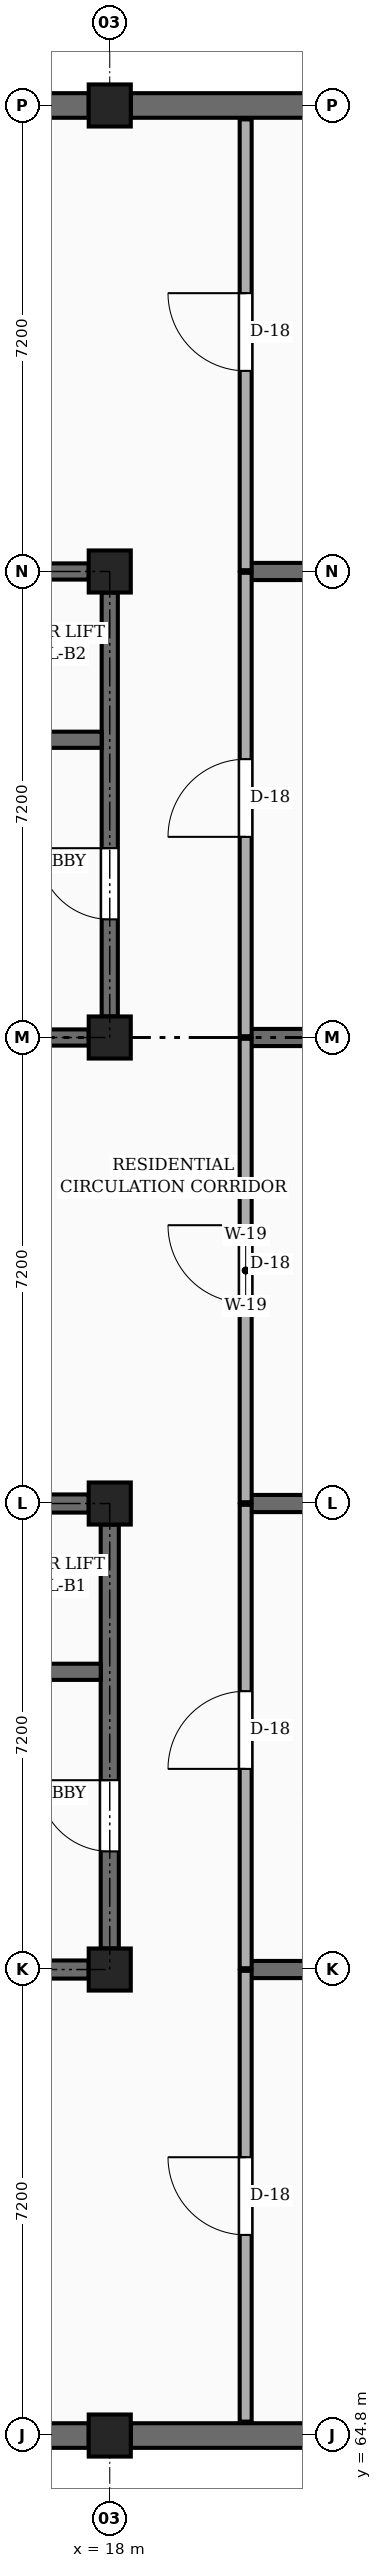
"""IFC4 building model, lengths in metres.
Left out: names, types, materials, properties, quantities, classifications, styles, units other than length and angle.
Written with IfcOpenShell. Run it as: python <this file> out.ifc"""

import sys

from ifc_helpers import new_model, si_unit, direction, frame, frame_2d, origin, origin_2d, place, context, subcontext, project, spatial, rectangle, extrude, element, fill, save


model = new_model("IFC4")
c1 = context("Model", 3, precision=1e-05, world=origin(), true_north=direction((0.0, 1.0)))
c2 = subcontext(c1, "Body", "Model", "MODEL_VIEW")
j1 = project(units=[si_unit("LENGTHUNIT", "METRE"), si_unit("PLANEANGLEUNIT", "RADIAN")], contexts=[c1])
p1 = place(None, origin())
s1 = spatial("IfcSite", under=j1, at=p1, CompositionType="ELEMENT")
p2 = place(p1, origin())
s2 = spatial("IfcBuilding", under=s1, at=p2, CompositionType="ELEMENT")
p3 = place(p2, frame((0.0, 0.0, -4.2)))
s3 = spatial("IfcBuildingStorey", under=s2, at=p3, CompositionType="ELEMENT", Elevation=-4.2)
for number, where, z_axis, x_axis in (
    (1, (18.0, 64.8, 0.0), (0.0, 0.0, 1.0), (1.0, 0.0, 0.0)),
    (2, (18.0, 72.0, 0.0), (0.0, 0.0, 1.0), (1.0, 0.0, 0.0)),
    (3, (18.0, 79.2, 0.0), (0.0, 0.0, 1.0), (1.0, 0.0, 0.0)),
    (4, (18.0, 86.4, 0.0), (0.0, 0.0, 1.0), (1.0, 0.0, 0.0)),
    (5, (18.0, 93.6, 0.0), (0.0, 0.0, 1.0), (1.0, 0.0, 0.0)),
    (6, (18.0, 100.8, 0.0), (0.0, 0.0, 1.0), (1.0, 0.0, 0.0)),
):
    element("IfcColumn", number, at=place(p3, frame(where, z_axis=z_axis, x_axis=x_axis)), inside=s3, PredefinedType="COLUMN", context=c2, shape_type="SweptSolid", body=[
        extrude(rectangle(XDim=0.65, YDim=0.65, at=origin_2d()), origin(), (0.0, 0.0, 1.0), 4.2),
    ])
for number, where, z_axis, x_axis in (
    (7, (11.125, 64.8, 0.0), (0.0, 0.0, 1.0), (1.0, 0.0, 0.0)),
    (8, (17.675, 100.8, 0.0), (0.0, 0.0, 1.0), (-1.0, 0.0, 0.0)),
    (9, (18.325, 64.8, 0.0), (0.0, 0.0, 1.0), (1.0, 0.0, 0.0)),
    (10, (24.875, 100.8, 0.0), (0.0, 0.0, 1.0), (-1.0, 0.0, 0.0)),
):
    element("IfcWall", number, at=place(p3, frame(where, z_axis=z_axis, x_axis=x_axis)), inside=s3, PredefinedType="USERDEFINED", context=c2, shape_type="SweptSolid", body=[
        extrude(rectangle(XDim=6.55, YDim=0.38, at=frame_2d((3.275, 0.0))), origin(), (0.0, 0.0, 1.0), 3.03),
    ])
for number, where, z_axis, x_axis in (
    (11, (20.1, 72.0, 0.0), (0.0, 0.0, 1.0), (1.0, 0.0, 0.0)),
    (12, (20.1, 79.2, 0.0), (0.0, 0.0, 1.0), (1.0, 0.0, 0.0)),
    (13, (20.1, 86.4, 0.0), (0.0, 0.0, 1.0), (1.0, 0.0, 0.0)),
    (14, (20.1, 93.6, 0.0), (0.0, 0.0, 1.0), (1.0, 0.0, 0.0)),
):
    element("IfcWall", number, at=place(p3, frame(where, z_axis=z_axis, x_axis=x_axis)), inside=s3, PredefinedType="SOLIDWALL", context=c2, shape_type="SweptSolid", body=[
        extrude(rectangle(XDim=4.775, YDim=0.265, at=frame_2d((2.387, 0.0))), origin(), (0.0, 0.0, 1.0), 3.18),
    ])
p4 = place(p3, frame((11.125, 79.2, 0.0), z_axis=(0.0, 0.0, 1.0), x_axis=(1.0, 0.0, 0.0)))
e15 = element("IfcWall", 15, at=p4, inside=s3, PredefinedType="SHEAR", context=c2, shape_type="SweptSolid", body=[
    extrude(rectangle(XDim=6.55, YDim=0.28, at=frame_2d((3.275, 0.0))), origin(), (0.0, 0.0, 1.0), 3.88),
])
p5 = place(p3, frame((18.0, 72.325, 0.0), z_axis=(0.0, 0.0, 1.0), x_axis=(0.0, 1.0, 0.0)))
e16 = element("IfcWall", 16, at=p5, inside=s3, PredefinedType="SHEAR", context=c2, shape_type="SweptSolid", body=[
    extrude(rectangle(XDim=6.55, YDim=0.28, at=frame_2d((3.275, 0.0))), origin(), (0.0, 0.0, 1.0), 3.88),
])
p6 = place(p5, frame((1.5, 0.0, 0.0)))
e17 = element("IfcOpeningElement", 17, at=p6, cuts=e16, PredefinedType="OPENING", context=c2, shape_type="SweptSolid", body=[
    extrude(rectangle(XDim=1.1, YDim=2.15, at=frame_2d((0.55, 1.075))), frame((0.0, 0.15, 0.0), z_axis=(0.0, -1.0, 0.0), x_axis=(1.0, 0.0, 0.0)), (0.0, 0.0, 1.0), 0.3),
])
p7 = place(p3, frame((11.125, 72.0, 0.0), z_axis=(0.0, 0.0, 1.0), x_axis=(1.0, 0.0, 0.0)))
e18 = element("IfcWall", 18, at=p7, inside=s3, PredefinedType="SHEAR", context=c2, shape_type="SweptSolid", body=[
    extrude(rectangle(XDim=6.55, YDim=0.28, at=frame_2d((3.275, 0.0))), origin(), (0.0, 0.0, 1.0), 3.88),
])
p8 = place(p7, frame((4.425, 0.0, 0.0)))
e19 = element("IfcOpeningElement", 19, at=p8, cuts=e18, PredefinedType="OPENING", context=c2, shape_type="SweptSolid", body=[
    extrude(rectangle(XDim=1.1, YDim=2.15, at=frame_2d((0.55, 1.075))), frame((0.0, 0.15, 0.0), z_axis=(0.0, -1.0, 0.0), x_axis=(1.0, 0.0, 0.0)), (0.0, 0.0, 1.0), 0.3),
])
p9 = place(p3, frame((14.525, 76.6, 0.0), z_axis=(0.0, 0.0, 1.0), x_axis=(1.0, 0.0, 0.0)))
e20 = element("IfcWall", 20, at=p9, inside=s3, PredefinedType="SHEAR", context=c2, shape_type="SweptSolid", body=[
    extrude(rectangle(XDim=3.335, YDim=0.25, at=frame_2d((1.667, 0.0))), origin(), (0.0, 0.0, 1.0), 3.88),
])
p10 = place(p9, frame((1.1, 0.0, 0.0)))
e21 = element("IfcOpeningElement", 21, at=p10, cuts=e20, PredefinedType="OPENING", context=c2, shape_type="SweptSolid", body=[
    extrude(rectangle(XDim=1.0, YDim=2.2, at=frame_2d((0.5, 1.1))), frame((0.0, 0.135, 0.0), z_axis=(0.0, -1.0, 0.0), x_axis=(1.0, 0.0, 0.0)), (0.0, 0.0, 1.0), 0.27),
])
p11 = place(p3, frame((11.125, 93.6, 0.0), z_axis=(0.0, 0.0, 1.0), x_axis=(1.0, 0.0, 0.0)))
e22 = element("IfcWall", 22, at=p11, inside=s3, PredefinedType="SHEAR", context=c2, shape_type="SweptSolid", body=[
    extrude(rectangle(XDim=6.55, YDim=0.25, at=frame_2d((3.275, 0.0))), origin(), (0.0, 0.0, 1.0), 3.88),
])
p12 = place(p3, frame((18.0, 86.725, 0.0), z_axis=(0.0, 0.0, 1.0), x_axis=(0.0, 1.0, 0.0)))
e23 = element("IfcWall", 23, at=p12, inside=s3, PredefinedType="SHEAR", context=c2, shape_type="SweptSolid", body=[
    extrude(rectangle(XDim=6.55, YDim=0.25, at=frame_2d((3.275, 0.0))), origin(), (0.0, 0.0, 1.0), 3.88),
])
p13 = place(p12, frame((1.5, 0.0, 0.0)))
e24 = element("IfcOpeningElement", 24, at=p13, cuts=e23, PredefinedType="OPENING", context=c2, shape_type="SweptSolid", body=[
    extrude(rectangle(XDim=1.1, YDim=2.15, at=frame_2d((0.55, 1.075))), frame((0.0, 0.135, 0.0), z_axis=(0.0, -1.0, 0.0), x_axis=(1.0, 0.0, 0.0)), (0.0, 0.0, 1.0), 0.27),
])
p14 = place(p3, frame((11.125, 86.4, 0.0), z_axis=(0.0, 0.0, 1.0), x_axis=(1.0, 0.0, 0.0)))
e25 = element("IfcWall", 25, at=p14, inside=s3, PredefinedType="SHEAR", context=c2, shape_type="SweptSolid", body=[
    extrude(rectangle(XDim=6.55, YDim=0.25, at=frame_2d((3.275, 0.0))), origin(), (0.0, 0.0, 1.0), 3.88),
])
p15 = place(p14, frame((4.425, 0.0, 0.0)))
e26 = element("IfcOpeningElement", 26, at=p15, cuts=e25, PredefinedType="OPENING", context=c2, shape_type="SweptSolid", body=[
    extrude(rectangle(XDim=1.1, YDim=2.15, at=frame_2d((0.55, 1.075))), frame((0.0, 0.135, 0.0), z_axis=(0.0, -1.0, 0.0), x_axis=(1.0, 0.0, 0.0)), (0.0, 0.0, 1.0), 0.27),
])
p16 = place(p3, frame((14.525, 91.0, 0.0), z_axis=(0.0, 0.0, 1.0), x_axis=(1.0, 0.0, 0.0)))
e27 = element("IfcWall", 27, at=p16, inside=s3, PredefinedType="SHEAR", context=c2, shape_type="SweptSolid", body=[
    extrude(rectangle(XDim=3.35, YDim=0.25, at=frame_2d((1.675, 0.0))), origin(), (0.0, 0.0, 1.0), 3.88),
])
p17 = place(p16, frame((1.1, 0.0, 0.0)))
e28 = element("IfcOpeningElement", 28, at=p17, cuts=e27, PredefinedType="OPENING", context=c2, shape_type="SweptSolid", body=[
    extrude(rectangle(XDim=1.0, YDim=2.2, at=frame_2d((0.5, 1.1))), frame((0.0, 0.135, 0.0), z_axis=(0.0, -1.0, 0.0), x_axis=(1.0, 0.0, 0.0)), (0.0, 0.0, 1.0), 0.27),
])
p18 = place(p3, frame((20.1, 65.015, 0.0), z_axis=(0.0, 0.0, 1.0), x_axis=(0.0, 1.0, 0.0)))
e29 = element("IfcWall", 29, at=p18, inside=s3, PredefinedType="PARTITIONING", context=c2, shape_type="SweptSolid", body=[
    extrude(rectangle(XDim=6.965, YDim=0.185, at=frame_2d((3.482, 0.0))), origin(), (0.0, 0.0, 1.0), 3.315),
])
p19 = place(p18, frame((2.885, 0.0, 0.0)))
e30 = element("IfcOpeningElement", 30, at=p19, cuts=e29, PredefinedType="OPENING", context=c2, shape_type="SweptSolid", body=[
    extrude(rectangle(XDim=1.2, YDim=2.2, at=frame_2d((0.6, 1.1))), frame((0.0, 0.103, 0.0), z_axis=(0.0, -1.0, 0.0), x_axis=(1.0, 0.0, 0.0)), (0.0, 0.0, 1.0), 0.205),
])
p20 = place(p3, frame((20.1, 72.02, 0.0), z_axis=(0.0, 0.0, 1.0), x_axis=(0.0, 1.0, 0.0)))
e31 = element("IfcWall", 31, at=p20, inside=s3, PredefinedType="PARTITIONING", context=c2, shape_type="SweptSolid", body=[
    extrude(rectangle(XDim=7.16, YDim=0.185, at=frame_2d((3.58, 0.0))), origin(), (0.0, 0.0, 1.0), 3.315),
])
p21 = place(p20, frame((3.08, 0.0, 0.0)))
e32 = element("IfcOpeningElement", 32, at=p21, cuts=e31, PredefinedType="OPENING", context=c2, shape_type="SweptSolid", body=[
    extrude(rectangle(XDim=1.2, YDim=2.2, at=frame_2d((0.6, 1.1))), frame((0.0, 0.103, 0.0), z_axis=(0.0, -1.0, 0.0), x_axis=(1.0, 0.0, 0.0)), (0.0, 0.0, 1.0), 0.205),
])
p22 = place(p3, frame((20.1, 79.22, 0.0), z_axis=(0.0, 0.0, 1.0), x_axis=(0.0, 1.0, 0.0)))
e33 = element("IfcWall", 33, at=p22, inside=s3, PredefinedType="PARTITIONING", context=c2, shape_type="SweptSolid", body=[
    extrude(rectangle(XDim=7.16, YDim=0.185, at=frame_2d((3.58, 0.0))), origin(), (0.0, 0.0, 1.0), 3.315),
])
p23 = place(p22, frame((3.08, 0.0, 0.0)))
e34 = element("IfcOpeningElement", 34, at=p23, cuts=e33, PredefinedType="OPENING", context=c2, shape_type="SweptSolid", body=[
    extrude(rectangle(XDim=1.2, YDim=2.2, at=frame_2d((0.6, 1.1))), frame((0.0, 0.103, 0.0), z_axis=(0.0, -1.0, 0.0), x_axis=(1.0, 0.0, 0.0)), (0.0, 0.0, 1.0), 0.205),
])
p24 = place(p3, frame((20.1, 86.42, 0.0), z_axis=(0.0, 0.0, 1.0), x_axis=(0.0, 1.0, 0.0)))
e35 = element("IfcWall", 35, at=p24, inside=s3, PredefinedType="PARTITIONING", context=c2, shape_type="SweptSolid", body=[
    extrude(rectangle(XDim=7.16, YDim=0.185, at=frame_2d((3.58, 0.0))), origin(), (0.0, 0.0, 1.0), 3.315),
])
p25 = place(p24, frame((3.08, 0.0, 0.0)))
e36 = element("IfcOpeningElement", 36, at=p25, cuts=e35, PredefinedType="OPENING", context=c2, shape_type="SweptSolid", body=[
    extrude(rectangle(XDim=1.2, YDim=2.2, at=frame_2d((0.6, 1.1))), frame((0.0, 0.103, 0.0), z_axis=(0.0, -1.0, 0.0), x_axis=(1.0, 0.0, 0.0)), (0.0, 0.0, 1.0), 0.205),
])
p26 = place(p3, frame((20.1, 93.62, 0.0), z_axis=(0.0, 0.0, 1.0), x_axis=(0.0, 1.0, 0.0)))
e37 = element("IfcWall", 37, at=p26, inside=s3, PredefinedType="PARTITIONING", context=c2, shape_type="SweptSolid", body=[
    extrude(rectangle(XDim=6.965, YDim=0.185, at=frame_2d((3.482, 0.0))), origin(), (0.0, 0.0, 1.0), 3.315),
])
p27 = place(p26, frame((3.08, 0.0, 0.0)))
e38 = element("IfcOpeningElement", 38, at=p27, cuts=e37, PredefinedType="OPENING", context=c2, shape_type="SweptSolid", body=[
    extrude(rectangle(XDim=1.2, YDim=2.2, at=frame_2d((0.6, 1.1))), frame((0.0, 0.103, 0.0), z_axis=(0.0, -1.0, 0.0), x_axis=(1.0, 0.0, 0.0)), (0.0, 0.0, 1.0), 0.205),
])
p28 = place(p6, frame((1.1, 0.0, 0.0), z_axis=(0.0, 0.0, 1.0), x_axis=(-1.0, 0.0, 0.0)))
e39 = element("IfcDoor", 39, at=p28, inside=s3, OperationType="SINGLE_SWING_RIGHT", PredefinedType="DOOR", context=c2, shape_type="SweptSolid", body=[
    extrude(rectangle(XDim=1.1, YDim=2.15, at=frame_2d((0.55, 1.075))), frame((0.0, 0.025, 0.0), z_axis=(0.0, -1.0, 0.0), x_axis=(1.0, 0.0, 0.0)), (0.0, 0.0, 1.0), 0.05),
])
fill(e17, e39)
p29 = place(p13, frame((1.1, 0.0, 0.0), z_axis=(0.0, 0.0, 1.0), x_axis=(-1.0, 0.0, 0.0)))
e40 = element("IfcDoor", 40, at=p29, inside=s3, OperationType="SINGLE_SWING_RIGHT", PredefinedType="DOOR", context=c2, shape_type="SweptSolid", body=[
    extrude(rectangle(XDim=1.1, YDim=2.15, at=frame_2d((0.55, 1.075))), frame((0.0, 0.025, 0.0), z_axis=(0.0, -1.0, 0.0), x_axis=(1.0, 0.0, 0.0)), (0.0, 0.0, 1.0), 0.05),
])
fill(e24, e40)
p30 = place(p19, origin())
e41 = element("IfcDoor", 41, at=p30, inside=s3, OperationType="SINGLE_SWING_RIGHT", PredefinedType="DOOR", context=c2, shape_type="SweptSolid", body=[
    extrude(rectangle(XDim=1.2, YDim=2.2, at=frame_2d((0.6, 1.1))), frame((0.0, 0.025, 0.0), z_axis=(0.0, -1.0, 0.0), x_axis=(1.0, 0.0, 0.0)), (0.0, 0.0, 1.0), 0.05),
])
fill(e30, e41)
p31 = place(p21, origin())
e42 = element("IfcDoor", 42, at=p31, inside=s3, OperationType="SINGLE_SWING_LEFT", PredefinedType="DOOR", context=c2, shape_type="SweptSolid", body=[
    extrude(rectangle(XDim=1.2, YDim=2.2, at=frame_2d((0.6, 1.1))), frame((0.0, 0.025, 0.0), z_axis=(0.0, -1.0, 0.0), x_axis=(1.0, 0.0, 0.0)), (0.0, 0.0, 1.0), 0.05),
])
fill(e32, e42)
p32 = place(p23, origin())
e43 = element("IfcDoor", 43, at=p32, inside=s3, OperationType="SINGLE_SWING_RIGHT", PredefinedType="DOOR", context=c2, shape_type="SweptSolid", body=[
    extrude(rectangle(XDim=1.2, YDim=2.2, at=frame_2d((0.6, 1.1))), frame((0.0, 0.025, 0.0), z_axis=(0.0, -1.0, 0.0), x_axis=(1.0, 0.0, 0.0)), (0.0, 0.0, 1.0), 0.05),
])
fill(e34, e43)
p33 = place(p25, origin())
e44 = element("IfcDoor", 44, at=p33, inside=s3, OperationType="SINGLE_SWING_LEFT", PredefinedType="DOOR", context=c2, shape_type="SweptSolid", body=[
    extrude(rectangle(XDim=1.2, YDim=2.2, at=frame_2d((0.6, 1.1))), frame((0.0, 0.025, 0.0), z_axis=(0.0, -1.0, 0.0), x_axis=(1.0, 0.0, 0.0)), (0.0, 0.0, 1.0), 0.05),
])
fill(e36, e44)
p34 = place(p27, origin())
e45 = element("IfcDoor", 45, at=p34, inside=s3, OperationType="SINGLE_SWING_RIGHT", PredefinedType="DOOR", context=c2, shape_type="SweptSolid", body=[
    extrude(rectangle(XDim=1.2, YDim=2.2, at=frame_2d((0.6, 1.1))), frame((0.0, 0.025, 0.0), z_axis=(0.0, -1.0, 0.0), x_axis=(1.0, 0.0, 0.0)), (0.0, 0.0, 1.0), 0.05),
])
fill(e38, e45)
save(model, sys.argv[1])
